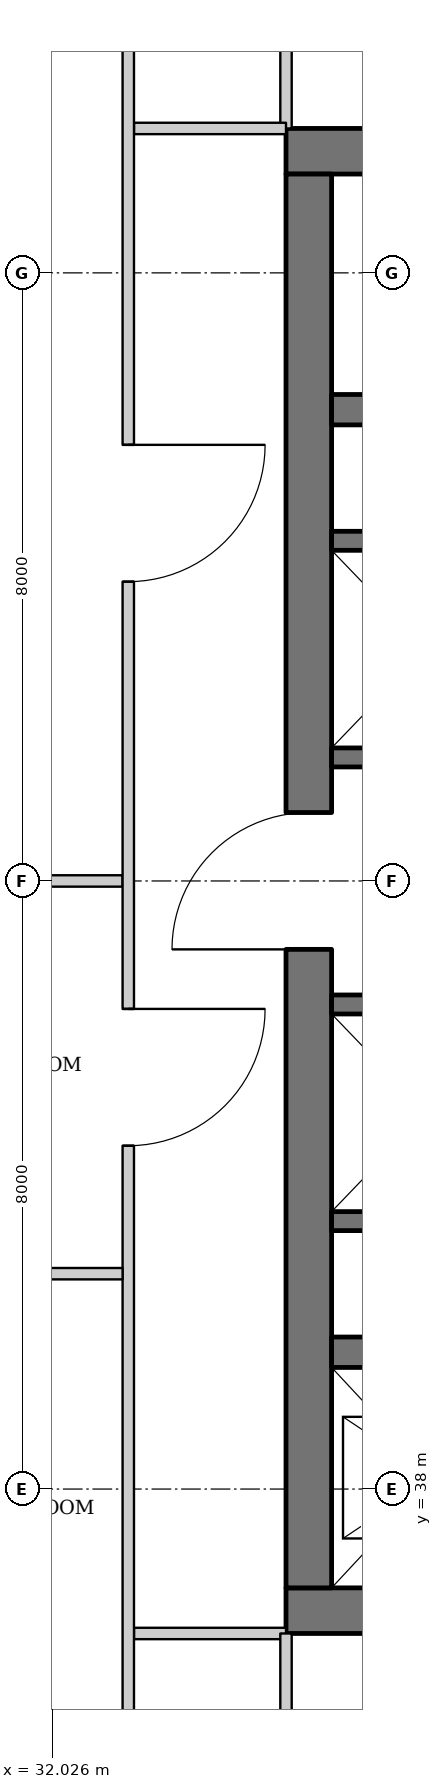
"""IFC4 building model, lengths in metres.
Left out: names, types, materials, properties, quantities, classifications, styles, units other than length and angle.
Written with IfcOpenShell. Run it as: python <this file> out.ifc"""

import sys

from ifc_helpers import new_model, si_unit, direction, frame, frame_2d, origin, place, context, subcontext, project, spatial, rectangle, extrude, element, fill, save


model = new_model("IFC4")
c1 = context("Model", 3, precision=1e-05, world=origin(), true_north=direction((0.0, 1.0)))
c2 = subcontext(c1, "Body", "Model", "MODEL_VIEW")
j1 = project(units=[si_unit("LENGTHUNIT", "METRE"), si_unit("PLANEANGLEUNIT", "RADIAN")], contexts=[c1])
p1 = place(None, origin())
s1 = spatial("IfcSite", under=j1, at=p1, CompositionType="ELEMENT")
p2 = place(p1, origin())
s2 = spatial("IfcBuilding", under=s1, at=p2, CompositionType="ELEMENT")
p3 = place(p2, frame((0.0, 0.0, 226.2)))
s3 = spatial("IfcBuildingStorey", under=s2, at=p3, CompositionType="ELEMENT", Elevation=226.2)
p4 = place(p3, frame((35.1, 36.4, 0.0), z_axis=(0.0, 0.0, 1.0), x_axis=(1.0, 0.0, 0.0)))
e1 = element("IfcWall", 1, at=p4, inside=s3, PredefinedType="SHEAR", context=c2, shape_type="SweptSolid", body=[
    extrude(rectangle(XDim=19.8, YDim=0.6, at=frame_2d((9.9, 0.0))), origin(), (0.0, 0.0, 1.0), 3.8),
])
p5 = place(p4, frame((3.9, 0.0, 0.0)))
e2 = element("IfcOpeningElement", 2, at=p5, cuts=e1, PredefinedType="OPENING", context=c2, shape_type="SweptSolid", body=[
    extrude(rectangle(XDim=1.0, YDim=2.1, at=frame_2d((0.5, 1.05))), frame((0.0, 0.31, 0.0), z_axis=(0.0, -1.0, 0.0), x_axis=(1.0, 0.0, 0.0)), (0.0, 0.0, 1.0), 0.62),
])
p6 = place(p4, frame((15.35, 0.0, 0.0)))
e3 = element("IfcOpeningElement", 3, at=p6, cuts=e1, PredefinedType="OPENING", context=c2, shape_type="SweptSolid", body=[
    extrude(rectangle(XDim=1.0, YDim=2.1, at=frame_2d((0.5, 1.05))), frame((0.0, 0.31, 0.0), z_axis=(0.0, -1.0, 0.0), x_axis=(1.0, 0.0, 0.0)), (0.0, 0.0, 1.0), 0.62),
])
p7 = place(p3, frame((35.1, 55.6, 0.0), z_axis=(0.0, 0.0, 1.0), x_axis=(1.0, 0.0, 0.0)))
e4 = element("IfcWall", 4, at=p7, inside=s3, PredefinedType="SHEAR", context=c2, shape_type="SweptSolid", body=[
    extrude(rectangle(XDim=19.8, YDim=0.6, at=frame_2d((9.9, 0.0))), origin(), (0.0, 0.0, 1.0), 3.8),
])
p8 = place(p7, frame((14.54, 0.0, 0.0)))
e5 = element("IfcOpeningElement", 5, at=p8, cuts=e4, PredefinedType="OPENING", context=c2, shape_type="SweptSolid", body=[
    extrude(rectangle(XDim=1.0, YDim=2.1, at=frame_2d((0.5, 1.05))), frame((0.0, 0.31, 0.0), z_axis=(0.0, -1.0, 0.0), x_axis=(1.0, 0.0, 0.0)), (0.0, 0.0, 1.0), 0.62),
])
p9 = place(p7, frame((2.425, 0.0, 0.0)))
e6 = element("IfcOpeningElement", 6, at=p9, cuts=e4, PredefinedType="OPENING", context=c2, shape_type="SweptSolid", body=[
    extrude(rectangle(XDim=1.0, YDim=2.1, at=frame_2d((0.5, 1.05))), frame((0.0, 0.31, 0.0), z_axis=(0.0, -1.0, 0.0), x_axis=(1.0, 0.0, 0.0)), (0.0, 0.0, 1.0), 0.62),
])
p10 = place(p3, frame((35.4, 36.7, 0.0), z_axis=(0.0, 0.0, 1.0), x_axis=(0.0, 1.0, 0.0)))
e7 = element("IfcWall", 7, at=p10, inside=s3, PredefinedType="SHEAR", context=c2, shape_type="SweptSolid", body=[
    extrude(rectangle(XDim=18.6, YDim=0.6, at=frame_2d((9.3, 0.0))), origin(), (0.0, 0.0, 1.0), 3.8),
])
p11 = place(p10, frame((8.4, 0.0, 0.0)))
e8 = element("IfcOpeningElement", 8, at=p11, cuts=e7, PredefinedType="OPENING", context=c2, shape_type="SweptSolid", body=[
    extrude(rectangle(XDim=1.8, YDim=2.4, at=frame_2d((0.9, 1.2))), frame((0.0, 0.31, 0.0), z_axis=(0.0, -1.0, 0.0), x_axis=(1.0, 0.0, 0.0)), (0.0, 0.0, 1.0), 0.62),
])
p12 = place(p3, frame((35.7, 39.8, 0.0), z_axis=(0.0, 0.0, 1.0), x_axis=(1.0, 0.0, 0.0)))
e9 = element("IfcWall", 9, at=p12, inside=s3, PredefinedType="SHEAR", context=c2, shape_type="SweptSolid", body=[
    extrude(rectangle(XDim=18.6, YDim=0.4, at=frame_2d((9.3, 0.0))), origin(), (0.0, 0.0, 1.0), 3.8),
])
p13 = place(p12, frame((3.3, 0.0, 0.0)))
e10 = element("IfcOpeningElement", 10, at=p13, cuts=e9, PredefinedType="OPENING", context=c2, shape_type="SweptSolid", body=[
    extrude(rectangle(XDim=1.0, YDim=2.1, at=frame_2d((0.5, 1.05))), frame((0.0, 0.21, 0.0), z_axis=(0.0, -1.0, 0.0), x_axis=(1.0, 0.0, 0.0)), (0.0, 0.0, 1.0), 0.42),
])
p14 = place(p3, frame((35.7, 52.2, 0.0), z_axis=(0.0, 0.0, 1.0), x_axis=(1.0, 0.0, 0.0)))
e11 = element("IfcWall", 11, at=p14, inside=s3, PredefinedType="SHEAR", context=c2, shape_type="SweptSolid", body=[
    extrude(rectangle(XDim=18.6, YDim=0.4, at=frame_2d((9.3, 0.0))), origin(), (0.0, 0.0, 1.0), 3.8),
])
p15 = place(p14, frame((11.33, 0.0, 0.0)))
e12 = element("IfcOpeningElement", 12, at=p15, cuts=e11, PredefinedType="OPENING", context=c2, shape_type="SweptSolid", body=[
    extrude(rectangle(XDim=1.0, YDim=2.1, at=frame_2d((0.5, 1.05))), frame((0.0, 0.21, 0.0), z_axis=(0.0, -1.0, 0.0), x_axis=(1.0, 0.0, 0.0)), (0.0, 0.0, 1.0), 0.42),
])
p16 = place(p3, frame((35.7, 50.475, 0.0), z_axis=(0.0, 0.0, 1.0), x_axis=(1.0, 0.0, 0.0)))
e13 = element("IfcWall", 13, at=p16, inside=s3, PredefinedType="SHEAR", context=c2, shape_type="SweptSolid", body=[
    extrude(rectangle(XDim=11.0, YDim=0.25, at=frame_2d((5.5, 0.0))), origin(), (0.0, 0.0, 1.0), 3.8),
])
p17 = place(p3, frame((35.7, 47.625, 0.0), z_axis=(0.0, 0.0, 1.0), x_axis=(1.0, 0.0, 0.0)))
e14 = element("IfcWall", 14, at=p17, inside=s3, PredefinedType="SHEAR", context=c2, shape_type="SweptSolid", body=[
    extrude(rectangle(XDim=12.83, YDim=0.25, at=frame_2d((6.415, 0.0))), origin(), (0.0, 0.0, 1.0), 3.8),
])
p18 = place(p17, frame((9.0, 0.0, 0.0)))
e15 = element("IfcOpeningElement", 15, at=p18, cuts=e14, PredefinedType="OPENING", context=c2, shape_type="SweptSolid", body=[
    extrude(rectangle(XDim=1.0, YDim=2.1, at=frame_2d((0.5, 1.05))), frame((0.0, 0.135, 0.0), z_axis=(0.0, -1.0, 0.0), x_axis=(1.0, 0.0, 0.0)), (0.0, 0.0, 1.0), 0.27),
])
p19 = place(p17, frame((11.415, 0.0, 0.0)))
e16 = element("IfcOpeningElement", 16, at=p19, cuts=e14, PredefinedType="OPENING", context=c2, shape_type="SweptSolid", body=[
    extrude(rectangle(XDim=1.0, YDim=2.1, at=frame_2d((0.5, 1.05))), frame((0.0, 0.135, 0.0), z_axis=(0.0, -1.0, 0.0), x_axis=(1.0, 0.0, 0.0)), (0.0, 0.0, 1.0), 0.27),
])
p20 = place(p3, frame((35.7, 41.525, 0.0), z_axis=(0.0, 0.0, 1.0), x_axis=(1.0, 0.0, 0.0)))
e17 = element("IfcWall", 17, at=p20, inside=s3, PredefinedType="SHEAR", context=c2, shape_type="SweptSolid", body=[
    extrude(rectangle(XDim=11.0, YDim=0.25, at=frame_2d((5.5, 0.0))), origin(), (0.0, 0.0, 1.0), 3.8),
])
p21 = place(p3, frame((35.7, 44.375, 0.0), z_axis=(0.0, 0.0, 1.0), x_axis=(1.0, 0.0, 0.0)))
e18 = element("IfcWall", 18, at=p21, inside=s3, PredefinedType="SHEAR", context=c2, shape_type="SweptSolid", body=[
    extrude(rectangle(XDim=12.83, YDim=0.25, at=frame_2d((6.415, 0.0))), origin(), (0.0, 0.0, 1.0), 3.8),
])
p22 = place(p21, frame((9.0, 0.0, 0.0)))
e19 = element("IfcOpeningElement", 19, at=p22, cuts=e18, PredefinedType="OPENING", context=c2, shape_type="SweptSolid", body=[
    extrude(rectangle(XDim=1.0, YDim=2.1, at=frame_2d((0.5, 1.05))), frame((0.0, 0.135, 0.0), z_axis=(0.0, -1.0, 0.0), x_axis=(1.0, 0.0, 0.0)), (0.0, 0.0, 1.0), 0.27),
])
p23 = place(p21, frame((11.415, 0.0, 0.0)))
e20 = element("IfcOpeningElement", 20, at=p23, cuts=e18, PredefinedType="OPENING", context=c2, shape_type="SweptSolid", body=[
    extrude(rectangle(XDim=1.0, YDim=2.1, at=frame_2d((0.5, 1.05))), frame((0.0, 0.135, 0.0), z_axis=(0.0, -1.0, 0.0), x_axis=(1.0, 0.0, 0.0)), (0.0, 0.0, 1.0), 0.27),
])
for number, where, z_axis, x_axis in (
    (21, (35.1, 55.9, 0.0), (0.0, 0.0, 1.0), (0.0, 1.0, 0.0)),
    (22, (35.1, 36.1, 0.0), (0.0, 0.0, 1.0), (-1.0, 0.0, 0.0)),
    (23, (35.1, 55.9, 0.0), (0.0, 0.0, 1.0), (-1.0, 0.0, 0.0)),
):
    element("IfcWall", number, at=place(p3, frame(where, z_axis=z_axis, x_axis=x_axis)), inside=s3, PredefinedType="PARTITIONING", context=c2, shape_type="SweptSolid", body=[
        extrude(rectangle(XDim=2.0, YDim=0.15, at=frame_2d((1.0, 0.0))), origin(), (0.0, 0.0, 1.0), 3.52),
    ])
p24 = place(p3, frame((32.95, 46.0, 0.0), z_axis=(0.0, 0.0, 1.0), x_axis=(-1.0, 0.0, 0.0)))
e24 = element("IfcWall", 24, at=p24, inside=s3, PredefinedType="SOLIDWALL", context=c2, shape_type="SweptSolid", body=[
    extrude(rectangle(XDim=4.92, YDim=0.15, at=frame_2d((2.46, 0.0))), origin(), (0.0, 0.0, 1.0), 3.52),
])
p25 = place(p3, frame((33.025, 58.05, 0.0), z_axis=(0.0, 0.0, 1.0), x_axis=(0.0, -1.0, 0.0)))
e25 = element("IfcWall", 25, at=p25, inside=s3, PredefinedType="SOLIDWALL", context=c2, shape_type="SweptSolid", body=[
    extrude(rectangle(XDim=23.95, YDim=0.15, at=frame_2d((11.975, 0.0))), origin(), (0.0, 0.0, 1.0), 2.706),
])
p26 = place(p25, frame((6.312, 0.0, 0.0)))
e26 = element("IfcOpeningElement", 26, at=p26, cuts=e25, PredefinedType="OPENING", context=c2, shape_type="SweptSolid", body=[
    extrude(rectangle(XDim=1.8, YDim=2.4, at=frame_2d((0.9, 1.2))), frame((0.0, 0.085, 0.0), z_axis=(0.0, -1.0, 0.0), x_axis=(1.0, 0.0, 0.0)), (0.0, 0.0, 1.0), 0.17),
])
p27 = place(p25, frame((13.733, 0.0, 0.0)))
e27 = element("IfcOpeningElement", 27, at=p27, cuts=e25, PredefinedType="OPENING", context=c2, shape_type="SweptSolid", body=[
    extrude(rectangle(XDim=1.8, YDim=2.4, at=frame_2d((0.9, 1.2))), frame((0.0, 0.085, 0.0), z_axis=(0.0, -1.0, 0.0), x_axis=(1.0, 0.0, 0.0)), (0.0, 0.0, 1.0), 0.17),
])
p28 = place(p3, frame((32.95, 40.833, 0.0), z_axis=(0.0, 0.0, 1.0), x_axis=(-1.0, 0.0, 0.0)))
e28 = element("IfcWall", 28, at=p28, inside=s3, PredefinedType="SOLIDWALL", context=c2, shape_type="SweptSolid", body=[
    extrude(rectangle(XDim=4.25, YDim=0.15, at=frame_2d((2.125, 0.0))), origin(), (0.0, 0.0, 1.0), 3.52),
])
p29 = place(p3, frame((35.1, 36.1, 0.0), z_axis=(0.0, 0.0, 1.0), x_axis=(0.0, -1.0, 0.0)))
e29 = element("IfcWall", 29, at=p29, inside=s3, PredefinedType="PARTITIONING", context=c2, shape_type="SweptSolid", body=[
    extrude(rectangle(XDim=2.0, YDim=0.15, at=frame_2d((1.0, 0.0))), origin(), (0.0, 0.0, 1.0), 3.52),
])
p30 = place(p11, origin())
e30 = element("IfcDoor", 30, at=p30, inside=s3, OperationType="DOUBLE_DOOR_SINGLE_SWING", PredefinedType="DOOR", context=c2, shape_type="SweptSolid", body=[
    extrude(rectangle(XDim=1.8, YDim=2.4, at=frame_2d((0.9, 1.2))), frame((0.0, 0.025, 0.0), z_axis=(0.0, -1.0, 0.0), x_axis=(1.0, 0.0, 0.0)), (0.0, 0.0, 1.0), 0.05),
])
fill(e8, e30)
p31 = place(p26, origin())
e31 = element("IfcDoor", 31, at=p31, inside=s3, OperationType="DOUBLE_DOOR_SINGLE_SWING", PredefinedType="DOOR", context=c2, shape_type="SweptSolid", body=[
    extrude(rectangle(XDim=1.8, YDim=2.4, at=frame_2d((0.9, 1.2))), frame((0.0, 0.025, 0.0), z_axis=(0.0, -1.0, 0.0), x_axis=(1.0, 0.0, 0.0)), (0.0, 0.0, 1.0), 0.05),
])
fill(e26, e31)
p32 = place(p27, origin())
e32 = element("IfcDoor", 32, at=p32, inside=s3, OperationType="DOUBLE_DOOR_SINGLE_SWING", PredefinedType="DOOR", context=c2, shape_type="SweptSolid", body=[
    extrude(rectangle(XDim=1.8, YDim=2.4, at=frame_2d((0.9, 1.2))), frame((0.0, 0.025, 0.0), z_axis=(0.0, -1.0, 0.0), x_axis=(1.0, 0.0, 0.0)), (0.0, 0.0, 1.0), 0.05),
])
fill(e27, e32)
save(model, sys.argv[1])
